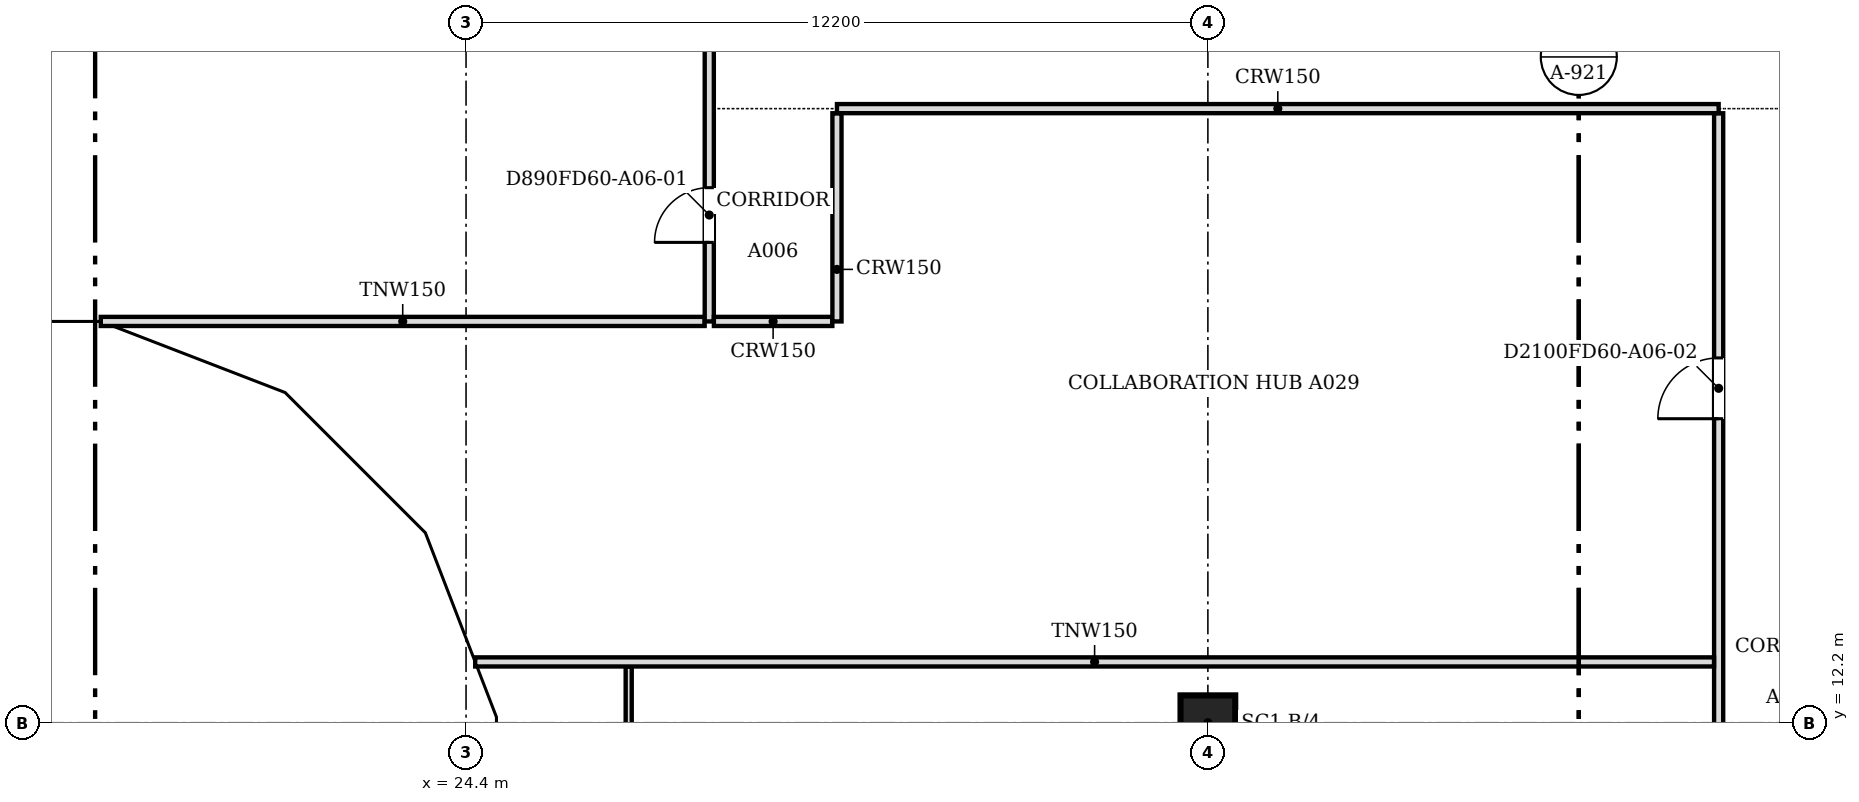
"""IFC4 building model, lengths in metres.
Left out: names, types, materials, properties, quantities, classifications, styles, units other than length and angle.
Written with IfcOpenShell. Run it as: python <this file> out.ifc"""

import sys

from ifc_helpers import new_model, si_unit, direction, frame, frame_2d, origin, origin_2d, place, context, subcontext, project, spatial, polyline, rectangle, outline, extrude, faceted_brep, source, transform, mapped, element, fill, save


model = new_model("IFC4")
c1 = context("Model", 3, precision=1e-05, world=origin(), true_north=direction((0.0, 1.0)))
c2 = subcontext(c1, "Body", "Model", "MODEL_VIEW")
j1 = project(units=[si_unit("LENGTHUNIT", "METRE"), si_unit("PLANEANGLEUNIT", "RADIAN")], contexts=[c1])
p1 = place(None, origin())
s1 = spatial("IfcSite", under=j1, at=p1, CompositionType="ELEMENT")
p2 = place(p1, origin())
s2 = spatial("IfcBuilding", under=s1, at=p2, CompositionType="ELEMENT")
p3 = place(p2, frame((0.0, 0.0, 72.4)))
s3 = spatial("IfcBuildingStorey", under=s2, at=p3, CompositionType="ELEMENT", Elevation=72.4)
p4 = place(p3, frame((36.6, 12.2, 0.0), z_axis=(0.0, 0.0, 1.0), x_axis=(1.0, 0.0, 0.0)))
e1 = element("IfcColumn", 1, at=p4, inside=s3, PredefinedType="COLUMN", context=c2, shape_type="SweptSolid", body=[
    extrude(rectangle(XDim=0.9, YDim=0.9, at=origin_2d()), origin(), (0.0, 0.0, 1.0), 3.6),
])
m1 = source(origin(), c2, "Body", "Brep", [
    faceted_brep([(3.05, -0.25, 0.0), (6.1, -0.25, 3.743), (6.1, -0.25, 3.857), (3.05, -0.25, 7.6), (0.0, -0.25, 3.8), (0.0, 0.25, 3.8), (3.05, 0.25, 7.6), (6.146, 0.25, 3.8), (3.05, 0.25, 0.0), (6.146, -0.0, 3.8)], [[[0, 1, 2, 3, 4]], [[5, 6, 7, 8]], [[8, 7, 9, 1, 0]], [[7, 6, 3, 2, 9]], [[6, 5, 4, 3]], [[5, 8, 0, 4]], [[1, 9, 2]]]),
])
p5 = place(p3, frame((12.2, 18.55, -3.8), z_axis=(0.0, 0.0, 1.0), x_axis=(1.0, 0.0, 0.0)))
e2 = element("IfcWall", 2, at=p5, inside=s3, PredefinedType="SOLIDWALL", context=c2, shape_type="MappedRepresentation", body=[
    mapped(m1, transform((0.0, 0.0, 0.0), scale=1.0)),
])
m2 = source(origin(), c2, "Body", "SweptSolid", [
    extrude(outline(polyline([(3.052, 0.397), (5.824, 3.8), (3.052, 7.202), (0.321, 3.8), (3.052, 0.397)])), frame((0.0, 0.26, 0.0), z_axis=(0.0, -1.0, 0.0), x_axis=(1.0, 0.0, 0.0)), (0.0, 0.0, 1.0), 0.52),
])
p6 = place(p5, origin())
e3 = element("IfcOpeningElement", 3, at=p6, cuts=e2, PredefinedType="OPENING", context=c2, shape_type="MappedRepresentation", body=[
    mapped(m2, transform((0.0, 0.0, 0.0), scale=1.0)),
])
m3 = source(origin(), c2, "Body", "Brep", [
    faceted_brep([(3.096, -0.25, 7.536), (0.047, -0.25, 3.856), (0.047, -0.25, 3.744), (3.096, -0.25, 0.064), (0.0, 0.25, 3.8), (3.149, 0.25, 7.6), (3.202, 0.25, 7.536), (3.202, 0.25, 0.064), (3.149, 0.25, 0.0), (3.149, -0.0, 0.0), (3.149, -0.0, 7.6), (0.0, 0.0, 3.8)], [[[0, 1, 2, 3]], [[4, 5, 6, 7, 8]], [[8, 7, 9]], [[6, 5, 10]], [[5, 4, 11, 1, 0, 10]], [[4, 8, 9, 3, 2, 11]], [[11, 2, 1]], [[3, 9, 7, 6, 10, 0]]]),
])
p7 = place(p3, frame((18.346, 18.55, -3.8), z_axis=(0.0, 0.0, 1.0), x_axis=(0.932985567668, -0.359913782069, 0.0)))
e4 = element("IfcWall", 4, at=p7, inside=s3, PredefinedType="SOLIDWALL", context=c2, shape_type="MappedRepresentation", body=[
    mapped(m3, transform((0.0, 0.0, 0.0), scale=1.0)),
])
m4 = source(origin(), c2, "Body", "SweptSolid", [
    extrude(outline(polyline([(2.949, 6.967), (0.325, 3.8), (2.949, 0.633), (2.949, 6.967)])), frame((0.0, 0.26, 0.0), z_axis=(0.0, -1.0, 0.0), x_axis=(1.0, 0.0, 0.0)), (0.0, 0.0, 1.0), 0.52),
])
p8 = place(p7, origin())
e5 = element("IfcOpeningElement", 5, at=p8, cuts=e4, PredefinedType="OPENING", context=c2, shape_type="MappedRepresentation", body=[
    mapped(m4, transform((0.0, 0.0, 0.0), scale=1.0)),
])
m5 = source(origin(), c2, "Body", "Brep", [
    faceted_brep([(0.106, -0.25, 0.064), (3.156, -0.25, 3.736), (3.156, -0.25, 3.864), (0.106, -0.25, 7.536), (0.0, 0.25, 7.536), (0.053, 0.25, 7.6), (3.209, 0.25, 3.8), (0.053, 0.25, 0.0), (0.0, 0.25, 0.064), (3.209, -0.0, 3.8), (0.053, 0.0, 0.0), (0.053, 0.0, 7.6)], [[[0, 1, 2, 3]], [[4, 5, 6, 7, 8]], [[7, 6, 9, 1, 0, 10]], [[6, 5, 11, 3, 2, 9]], [[5, 4, 11]], [[8, 7, 10]], [[8, 10, 0, 3, 11, 4]], [[1, 9, 2]]]),
])
p9 = place(p3, frame((21.248, 17.454, -3.8), z_axis=(0.0, 0.0, 1.0), x_axis=(0.707106781187, -0.707106781187, 0.0)))
e6 = element("IfcWall", 6, at=p9, inside=s3, PredefinedType="SOLIDWALL", context=c2, shape_type="MappedRepresentation", body=[
    mapped(m5, transform((0.0, 0.0, 0.0), scale=1.0)),
])
m6 = source(origin(), c2, "Body", "SweptSolid", [
    extrude(outline(polyline([(0.253, 0.632), (2.884, 3.8), (0.253, 6.968), (0.253, 0.632)])), frame((0.0, 0.26, 0.0), z_axis=(0.0, -1.0, 0.0), x_axis=(1.0, 0.0, 0.0)), (0.0, 0.0, 1.0), 0.52),
])
p10 = place(p9, origin())
e7 = element("IfcOpeningElement", 7, at=p10, cuts=e6, PredefinedType="OPENING", context=c2, shape_type="MappedRepresentation", body=[
    mapped(m6, transform((0.0, 0.0, 0.0), scale=1.0)),
])
m7 = source(origin(), c2, "Body", "Brep", [
    faceted_brep([(3.103, -0.25, 7.544), (0.053, -0.25, 3.864), (0.053, -0.25, 3.736), (3.103, -0.25, 0.056), (0.0, 0.25, 3.8), (3.149, 0.25, 7.6), (3.196, 0.25, 7.543), (3.196, 0.25, 0.057), (3.149, 0.25, 0.0), (3.149, -0.0, 0.0), (3.149, -0.0, 7.6), (0.0, 0.0, 3.8)], [[[0, 1, 2, 3]], [[4, 5, 6, 7, 8]], [[8, 7, 9]], [[6, 5, 10]], [[5, 4, 11, 1, 0, 10]], [[4, 8, 9, 3, 2, 11]], [[11, 2, 1]], [[3, 9, 7, 6, 10, 0]]]),
])
p11 = place(p3, frame((23.517, 15.185, -3.8), z_axis=(0.0, 0.0, 1.0), x_axis=(0.359864468756, -0.933004589553, 0.0)))
e8 = element("IfcWall", 8, at=p11, inside=s3, PredefinedType="SOLIDWALL", context=c2, shape_type="MappedRepresentation", body=[
    mapped(m7, transform((0.0, 0.0, 0.0), scale=1.0)),
])
p12 = place(p11, origin())
e9 = element("IfcOpeningElement", 9, at=p12, cuts=e8, PredefinedType="OPENING", context=c2, shape_type="MappedRepresentation", body=[
    mapped(m4, transform((0.0, 0.0, 0.0), scale=1.0)),
])
m8 = source(origin(), c2, "Body", "Brep", [
    faceted_brep([(0.093, -0.25, 0.057), (3.143, -0.25, 3.8), (0.093, -0.25, 7.543), (0.0, 0.25, 7.544), (0.047, 0.25, 7.6), (3.143, 0.25, 3.8), (0.047, 0.25, 0.0), (0.0, 0.25, 0.056), (0.047, 0.0, 0.0), (0.047, 0.0, 7.6)], [[[0, 1, 2]], [[3, 4, 5, 6, 7]], [[6, 5, 1, 0, 8]], [[5, 4, 9, 2, 1]], [[4, 3, 9]], [[7, 6, 8]], [[7, 8, 0, 2, 9, 3]]]),
])
p13 = place(p3, frame((24.65, 12.293, -3.8), z_axis=(0.0, 0.0, 1.0), x_axis=(0.0, -1.0, 0.0)))
e10 = element("IfcWall", 10, at=p13, inside=s3, PredefinedType="SOLIDWALL", context=c2, shape_type="MappedRepresentation", body=[
    mapped(m8, transform((0.0, 0.0, 0.0), scale=1.0)),
])
m9 = source(origin(), c2, "Body", "SweptSolid", [
    extrude(outline(polyline([(0.247, 0.641), (2.821, 3.8), (0.247, 6.959), (0.247, 0.641)])), frame((0.0, 0.26, 0.0), z_axis=(0.0, -1.0, 0.0), x_axis=(1.0, 0.0, 0.0)), (0.0, 0.0, 1.0), 0.52),
])
p14 = place(p13, origin())
e11 = element("IfcOpeningElement", 11, at=p14, cuts=e10, PredefinedType="OPENING", context=c2, shape_type="MappedRepresentation", body=[
    mapped(m9, transform((0.0, 0.0, 0.0), scale=1.0)),
])
p15 = place(p2, frame((0.0, 0.0, 76.2)))
s4 = spatial("IfcBuildingStorey", under=s2, at=p15, CompositionType="ELEMENT", Elevation=76.2)
m10 = source(origin(), c2, "Body", "Brep", [
    faceted_brep([(3.05, -0.25, 7.543), (0.0, -0.25, 3.8), (3.05, -0.25, 0.057), (0.0, 0.25, 3.8), (3.096, 0.25, 7.6), (3.143, 0.25, 7.544), (3.143, 0.25, 0.056), (3.096, 0.25, 0.0), (3.096, -0.0, 0.0), (3.096, -0.0, 7.6)], [[[0, 1, 2]], [[3, 4, 5, 6, 7]], [[7, 6, 8]], [[5, 4, 9]], [[4, 3, 1, 0, 9]], [[3, 7, 8, 2, 1]], [[2, 8, 6, 5, 9, 0]]]),
])
p16 = place(p15, frame((15.25, 18.55, -3.8), z_axis=(0.0, 0.0, 1.0), x_axis=(1.0, 0.0, 0.0)))
e12 = element("IfcWall", 12, at=p16, inside=s4, PredefinedType="SOLIDWALL", context=c2, shape_type="MappedRepresentation", body=[
    mapped(m10, transform((0.0, 0.0, 0.0), scale=1.0)),
])
m11 = source(origin(), c2, "Body", "SweptSolid", [
    extrude(outline(polyline([(2.896, 6.959), (0.323, 3.8), (2.896, 0.641), (2.896, 6.959)])), frame((0.0, 0.26, 0.0), z_axis=(0.0, -1.0, 0.0), x_axis=(1.0, 0.0, 0.0)), (0.0, 0.0, 1.0), 0.52),
])
p17 = place(p16, origin())
e13 = element("IfcOpeningElement", 13, at=p17, cuts=e12, PredefinedType="OPENING", context=c2, shape_type="MappedRepresentation", body=[
    mapped(m11, transform((0.0, 0.0, 0.0), scale=1.0)),
])
m12 = source(origin(), c2, "Body", "Brep", [
    faceted_brep([(0.093, -0.25, 0.056), (3.143, -0.25, 3.736), (3.143, -0.25, 3.864), (0.093, -0.25, 7.544), (0.0, 0.25, 7.543), (0.047, 0.25, 7.6), (3.196, 0.25, 3.8), (0.047, 0.25, 0.0), (0.0, 0.25, 0.057), (3.196, -0.0, 3.8), (0.047, 0.0, 0.0), (0.047, 0.0, 7.6)], [[[0, 1, 2, 3]], [[4, 5, 6, 7, 8]], [[7, 6, 9, 1, 0, 10]], [[6, 5, 11, 3, 2, 9]], [[5, 4, 11]], [[8, 7, 10]], [[8, 10, 0, 3, 11, 4]], [[1, 9, 2]]]),
])
p18 = place(p15, frame((18.303, 18.567, -3.8), z_axis=(0.0, 0.0, 1.0), x_axis=(0.932978940178, -0.359930961693, 0.0)))
e14 = element("IfcWall", 14, at=p18, inside=s4, PredefinedType="SOLIDWALL", context=c2, shape_type="MappedRepresentation", body=[
    mapped(m12, transform((0.0, 0.0, 0.0), scale=1.0)),
])
m13 = source(origin(), c2, "Body", "SweptSolid", [
    extrude(outline(polyline([(0.247, 0.633), (2.871, 3.8), (0.247, 6.967), (0.247, 0.633)])), frame((0.0, 0.26, 0.0), z_axis=(0.0, -1.0, 0.0), x_axis=(1.0, 0.0, 0.0)), (0.0, 0.0, 1.0), 0.52),
])
p19 = place(p18, origin())
e15 = element("IfcOpeningElement", 15, at=p19, cuts=e14, PredefinedType="OPENING", context=c2, shape_type="MappedRepresentation", body=[
    mapped(m13, transform((0.0, 0.0, 0.0), scale=1.0)),
])
m14 = source(origin(), c2, "Body", "Brep", [
    faceted_brep([(3.103, -0.25, 7.536), (0.053, -0.25, 3.864), (0.053, -0.25, 3.736), (3.103, -0.25, 0.064), (0.0, 0.25, 3.8), (3.156, 0.25, 7.6), (3.209, 0.25, 7.536), (3.209, 0.25, 0.064), (3.156, 0.25, 0.0), (3.156, -0.0, 0.0), (3.156, -0.0, 7.6), (0.0, 0.0, 3.8)], [[[0, 1, 2, 3]], [[4, 5, 6, 7, 8]], [[8, 7, 9]], [[6, 5, 10]], [[5, 4, 11, 1, 0, 10]], [[4, 8, 9, 3, 2, 11]], [[11, 2, 1]], [[3, 9, 7, 6, 10, 0]]]),
])
p20 = place(p15, frame((21.285, 17.417, -3.8), z_axis=(0.0, 0.0, 1.0), x_axis=(0.707106781187, -0.707106781187, 0.0)))
e16 = element("IfcWall", 16, at=p20, inside=s4, PredefinedType="SOLIDWALL", context=c2, shape_type="MappedRepresentation", body=[
    mapped(m14, transform((0.0, 0.0, 0.0), scale=1.0)),
])
m15 = source(origin(), c2, "Body", "SweptSolid", [
    extrude(outline(polyline([(2.956, 6.968), (0.325, 3.8), (2.956, 0.632), (2.956, 6.968)])), frame((0.0, 0.26, 0.0), z_axis=(0.0, -1.0, 0.0), x_axis=(1.0, 0.0, 0.0)), (0.0, 0.0, 1.0), 0.52),
])
p21 = place(p20, origin())
e17 = element("IfcOpeningElement", 17, at=p21, cuts=e16, PredefinedType="OPENING", context=c2, shape_type="MappedRepresentation", body=[
    mapped(m15, transform((0.0, 0.0, 0.0), scale=1.0)),
])
m16 = source(origin(), c2, "Body", "Brep", [
    faceted_brep([(0.106, -0.25, 0.064), (3.156, -0.25, 3.744), (3.156, -0.25, 3.856), (0.106, -0.25, 7.536), (0.0, 0.25, 7.536), (0.053, 0.25, 7.6), (3.202, 0.25, 3.8), (0.053, 0.25, 0.0), (0.0, 0.25, 0.064), (3.202, -0.0, 3.8), (0.053, 0.0, 0.0), (0.053, 0.0, 7.6)], [[[0, 1, 2, 3]], [[4, 5, 6, 7, 8]], [[7, 6, 9, 1, 0, 10]], [[6, 5, 11, 3, 2, 9]], [[5, 4, 11]], [[8, 7, 10]], [[8, 10, 0, 3, 11, 4]], [[1, 9, 2]]]),
])
p22 = place(p15, frame((23.497, 15.234, -3.8), z_axis=(0.0, 0.0, 1.0), x_axis=(0.359913782069, -0.932985567668, 0.0)))
e18 = element("IfcWall", 18, at=p22, inside=s4, PredefinedType="SOLIDWALL", context=c2, shape_type="MappedRepresentation", body=[
    mapped(m16, transform((0.0, 0.0, 0.0), scale=1.0)),
])
m17 = source(origin(), c2, "Body", "SweptSolid", [
    extrude(outline(polyline([(0.253, 0.633), (2.878, 3.8), (0.253, 6.967), (0.253, 0.633)])), frame((0.0, 0.26, 0.0), z_axis=(0.0, -1.0, 0.0), x_axis=(1.0, 0.0, 0.0)), (0.0, 0.0, 1.0), 0.52),
])
p23 = place(p22, origin())
e19 = element("IfcOpeningElement", 19, at=p23, cuts=e18, PredefinedType="OPENING", context=c2, shape_type="MappedRepresentation", body=[
    mapped(m17, transform((0.0, 0.0, 0.0), scale=1.0)),
])
m18 = source(origin(), c2, "Body", "Brep", [
    faceted_brep([(3.096, -0.25, 0.0), (6.1, -0.25, 3.8), (3.096, -0.25, 7.6), (0.047, -0.25, 3.857), (0.047, -0.25, 3.743), (0.0, 0.25, 3.8), (3.096, 0.25, 7.6), (6.053, 0.25, 3.859), (6.053, 0.25, 3.741), (3.096, 0.25, 0.0), (6.1, -0.0, 3.8), (0.0, 0.0, 3.8)], [[[0, 1, 2, 3, 4]], [[5, 6, 7, 8, 9]], [[9, 8, 10, 1, 0]], [[7, 6, 2, 1, 10]], [[6, 5, 11, 3, 2]], [[5, 9, 0, 4, 11]], [[11, 4, 3]], [[10, 8, 7]]]),
])
p24 = place(p15, frame((24.65, 12.247, -3.8), z_axis=(0.0, 0.0, 1.0), x_axis=(0.0, -1.0, 0.0)))
e20 = element("IfcWall", 20, at=p24, inside=s4, PredefinedType="SOLIDWALL", context=c2, shape_type="MappedRepresentation", body=[
    mapped(m18, transform((0.0, 0.0, 0.0), scale=1.0)),
])
m19 = source(origin(), c2, "Body", "SweptSolid", [
    extrude(outline(polyline([(3.094, 0.399), (5.781, 3.8), (3.094, 7.201), (0.323, 3.8), (3.094, 0.399)])), frame((0.0, 0.26, 0.0), z_axis=(0.0, -1.0, 0.0), x_axis=(1.0, 0.0, 0.0)), (0.0, 0.0, 1.0), 0.52),
])
p25 = place(p24, origin())
e21 = element("IfcOpeningElement", 21, at=p25, cuts=e20, PredefinedType="OPENING", context=c2, shape_type="MappedRepresentation", body=[
    mapped(m19, transform((0.0, 0.0, 0.0), scale=1.0)),
])
p26 = place(p3, frame((45.0, 0.5, 0.0), z_axis=(0.0, 0.0, 1.0), x_axis=(0.0, 1.0, 0.0)))
e22 = element("IfcWall", 22, at=p26, inside=s3, PredefinedType="PARTITIONING", context=c2, shape_type="SweptSolid", body=[
    extrude(rectangle(XDim=21.724, YDim=0.15, at=frame_2d((10.862, 0.0))), origin(), (0.0, 0.0, 1.0), 3.067),
])
m20 = source(origin(), c2, "Body", "SweptSolid", [
    extrude(rectangle(XDim=0.9, YDim=2.1, at=frame_2d((0.45, 1.05))), frame((0.0, 0.085, 0.0), z_axis=(0.0, -1.0, 0.0), x_axis=(1.0, 0.0, 0.0)), (0.0, 0.0, 1.0), 0.17),
])
p27 = place(p26, frame((7.7, 0.0, 0.0)))
e23 = element("IfcOpeningElement", 23, at=p27, cuts=e22, PredefinedType="OPENING", context=c2, shape_type="MappedRepresentation", body=[
    mapped(m20, transform((0.0, 0.0, 0.0), scale=1.0)),
])
m21 = source(origin(), c2, "Body", "SweptSolid", [
    extrude(rectangle(XDim=1.0, YDim=2.1, at=frame_2d((0.5, 1.05))), frame((0.0, 0.085, 0.0), z_axis=(0.0, -1.0, 0.0), x_axis=(1.0, 0.0, 0.0)), (0.0, 0.0, 1.0), 0.17),
])
p28 = place(p26, frame((16.7, 0.0, 0.0)))
e24 = element("IfcOpeningElement", 24, at=p28, cuts=e22, PredefinedType="OPENING", context=c2, shape_type="MappedRepresentation", body=[
    mapped(m21, transform((0.0, 0.0, 0.0), scale=1.0)),
])
p29 = place(p3, frame((27.075, 4.2, 0.0), z_axis=(0.0, 0.0, 1.0), x_axis=(0.0, 1.0, 0.0)))
e25 = element("IfcWall", 25, at=p29, inside=s3, PredefinedType="PARTITIONING", context=c2, shape_type="SweptSolid", body=[
    extrude(rectangle(XDim=8.924, YDim=0.1, at=frame_2d((4.462, 0.0))), origin(), (0.0, 0.0, 1.0), 3.067),
])
m22 = source(origin(), c2, "Body", "SweptSolid", [
    extrude(rectangle(XDim=0.9, YDim=2.1, at=frame_2d((0.45, 1.05))), frame((0.0, 0.06, 0.0), z_axis=(0.0, -1.0, 0.0), x_axis=(1.0, 0.0, 0.0)), (0.0, 0.0, 1.0), 0.12),
])
p30 = place(p29, frame((6.148, 0.0, 0.0)))
e26 = element("IfcOpeningElement", 26, at=p30, cuts=e25, PredefinedType="OPENING", context=c2, shape_type="MappedRepresentation", body=[
    mapped(m22, transform((0.0, 0.0, 0.0), scale=1.0)),
])
p31 = place(p29, frame((1.7, 0.0, 0.0)))
e27 = element("IfcOpeningElement", 27, at=p31, cuts=e25, PredefinedType="OPENING", context=c2, shape_type="MappedRepresentation", body=[
    mapped(m22, transform((0.0, 0.0, 0.0), scale=1.0)),
])
p32 = place(p3, frame((24.55, 13.2, 0.0), z_axis=(0.0, 0.0, 1.0), x_axis=(1.0, 0.0, 0.0)))
e28 = element("IfcWall", 28, at=p32, inside=s3, PredefinedType="PARTITIONING", context=c2, shape_type="SweptSolid", body=[
    extrude(rectangle(XDim=20.374, YDim=0.15, at=frame_2d((10.187, 0.0))), origin(), (0.0, 0.0, 1.0), 3.067),
])
p33 = place(p3, frame((18.393, 18.8, 0.0), z_axis=(0.0, 0.0, 1.0), x_axis=(1.0, 0.0, 0.0)))
e29 = element("IfcWall", 29, at=p33, inside=s3, PredefinedType="PARTITIONING", context=c2, shape_type="SweptSolid", body=[
    extrude(rectangle(XDim=9.931, YDim=0.15, at=frame_2d((4.965, 0.0))), origin(), (0.0, 0.0, 1.0), 3.067),
])
p34 = place(p3, frame((28.4, 18.8, 0.0), z_axis=(0.0, 0.0, 1.0), x_axis=(0.0, 1.0, 0.0)))
e30 = element("IfcWall", 30, at=p34, inside=s3, PredefinedType="PARTITIONING", context=c2, shape_type="SweptSolid", body=[
    extrude(rectangle(XDim=26.824, YDim=0.15, at=frame_2d((13.412, 0.0))), origin(), (0.0, 0.0, 1.0), 3.067),
])
p35 = place(p34, frame((1.3, 0.0, 0.0)))
e31 = element("IfcOpeningElement", 31, at=p35, cuts=e30, PredefinedType="OPENING", context=c2, shape_type="MappedRepresentation", body=[
    mapped(m20, transform((0.0, 0.0, 0.0), scale=1.0)),
])
p36 = place(p34, frame((23.351, 0.0, 0.0)))
e32 = element("IfcOpeningElement", 32, at=p36, cuts=e30, PredefinedType="OPENING", context=c2, shape_type="MappedRepresentation", body=[
    mapped(m20, transform((0.0, 0.0, 0.0), scale=1.0)),
])
p37 = place(p34, frame((17.351, 0.0, 0.0)))
e33 = element("IfcOpeningElement", 33, at=p37, cuts=e30, PredefinedType="OPENING", context=c2, shape_type="MappedRepresentation", body=[
    mapped(m20, transform((0.0, 0.0, 0.0), scale=1.0)),
])
p38 = place(p34, frame((9.7, 0.0, 0.0)))
e34 = element("IfcOpeningElement", 34, at=p38, cuts=e30, PredefinedType="OPENING", context=c2, shape_type="MappedRepresentation", body=[
    mapped(m20, transform((0.0, 0.0, 0.0), scale=1.0)),
])
p39 = place(p3, frame((28.476, 18.8, 0.0), z_axis=(0.0, 0.0, 1.0), x_axis=(1.0, 0.0, 0.0)))
e35 = element("IfcWall", 35, at=p39, inside=s3, PredefinedType="PARTITIONING", context=c2, shape_type="SweptSolid", body=[
    extrude(rectangle(XDim=1.948, YDim=0.15, at=frame_2d((0.974, 0.0))), origin(), (0.0, 0.0, 1.0), 3.067),
])
p40 = place(p3, frame((30.5, 18.8, 0.0), z_axis=(0.0, 0.0, 1.0), x_axis=(0.0, 1.0, 0.0)))
e36 = element("IfcWall", 36, at=p40, inside=s3, PredefinedType="PARTITIONING", context=c2, shape_type="SweptSolid", body=[
    extrude(rectangle(XDim=3.424, YDim=0.15, at=frame_2d((1.712, 0.0))), origin(), (0.0, 0.0, 1.0), 3.067),
])
p41 = place(p3, frame((30.5, 22.3, 0.0), z_axis=(0.0, 0.0, 1.0), x_axis=(1.0, 0.0, 0.0)))
e37 = element("IfcWall", 37, at=p41, inside=s3, PredefinedType="PARTITIONING", context=c2, shape_type="SweptSolid", body=[
    extrude(rectangle(XDim=14.5, YDim=0.15, at=frame_2d((7.25, 0.0))), origin(), (0.0, 0.0, 1.0), 3.067),
])
m23 = source(origin(), c2, "Body", "SweptSolid", [
    extrude(rectangle(XDim=0.9, YDim=2.1, at=frame_2d((0.45, 1.05))), frame((0.0, 0.025, 0.0), z_axis=(0.0, -1.0, 0.0), x_axis=(1.0, 0.0, 0.0)), (0.0, 0.0, 1.0), 0.05),
])
p42 = place(p35, origin())
e38 = element("IfcDoor", 38, at=p42, inside=s3, OperationType="SINGLE_SWING_LEFT", PredefinedType="DOOR", context=c2, shape_type="MappedRepresentation", body=[
    mapped(m23, transform((0.0, 0.0, 0.0), scale=1.0)),
])
fill(e31, e38)
m24 = source(origin(), c2, "Body", "SweptSolid", [
    extrude(rectangle(XDim=1.0, YDim=2.1, at=frame_2d((0.5, 1.05))), frame((0.0, 0.025, 0.0), z_axis=(0.0, -1.0, 0.0), x_axis=(1.0, 0.0, 0.0)), (0.0, 0.0, 1.0), 0.05),
])
p43 = place(p28, origin())
e39 = element("IfcDoor", 39, at=p43, inside=s3, OperationType="SINGLE_SWING_LEFT", PredefinedType="DOOR", context=c2, shape_type="MappedRepresentation", body=[
    mapped(m24, transform((0.0, 0.0, 0.0), scale=1.0)),
])
fill(e24, e39)
save(model, sys.argv[1])
